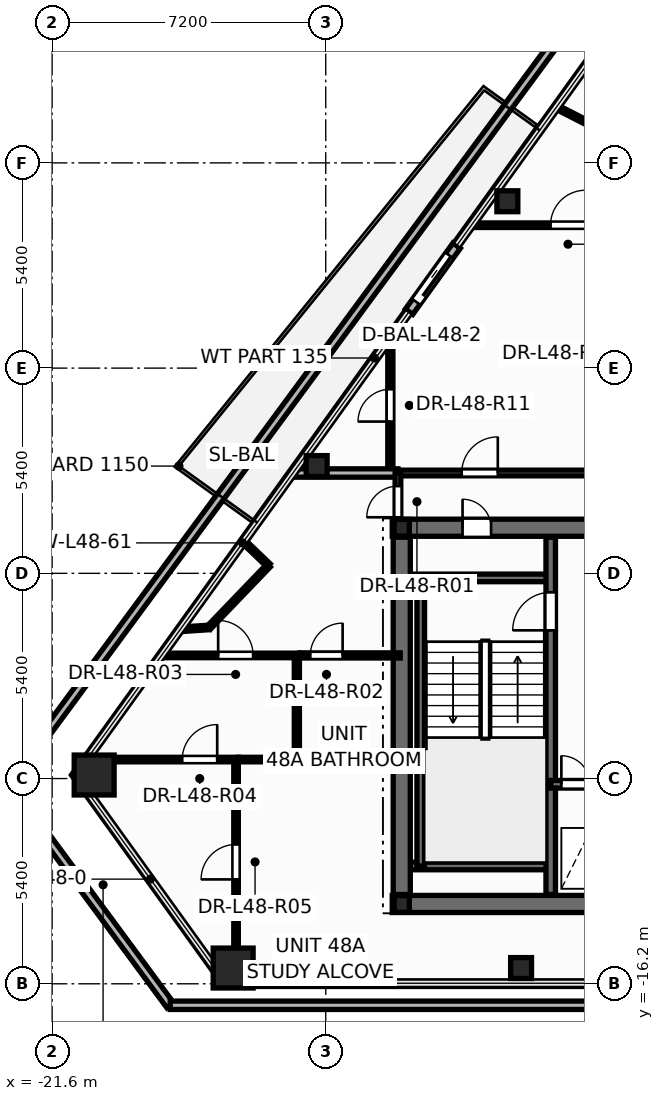
"""IFC4 building model, lengths in metres.
Left out: names, types, materials, properties, quantities, classifications, styles, units other than length and angle.
Written with IfcOpenShell. Run it as: python <this file> out.ifc"""

import sys

from ifc_helpers import new_model, si_unit, direction, frame, frame_2d, origin, origin_2d, place, context, subcontext, project, spatial, rectangle, hollow_rectangle, hollow_circle, i_section, extrude, element, fill, save


model = new_model("IFC4")
c1 = context("Model", 3, precision=1e-05, world=origin(), true_north=direction((0.0, 1.0)))
c2 = subcontext(c1, "Body", "Model", "MODEL_VIEW")
j1 = project(units=[si_unit("LENGTHUNIT", "METRE"), si_unit("PLANEANGLEUNIT", "RADIAN")], contexts=[c1])
p1 = place(None, origin())
s1 = spatial("IfcSite", under=j1, at=p1, CompositionType="ELEMENT")
p2 = place(p1, origin())
s2 = spatial("IfcBuilding", under=s1, at=p2, CompositionType="ELEMENT")
p3 = place(p2, frame((0.0, 0.0, 185.7)))
s3 = spatial("IfcBuildingStorey", under=s2, at=p3, CompositionType="ELEMENT", Elevation=185.7)
for number, where, z_axis, x_axis in (
    (1, (-20.494, -10.707, 0.0), (0.0, 0.0, 1.0), (1.0, 0.0, 0.0)),
    (2, (-16.836, -15.786, 0.0), (0.0, 0.0, 1.0), (1.0, 0.0, 0.0)),
):
    element("IfcColumn", number, at=place(p3, frame(where, z_axis=z_axis, x_axis=x_axis)), inside=s3, PredefinedType="COLUMN", context=c2, shape_type="SweptSolid", body=[
        extrude(hollow_rectangle(XDim=1.05, YDim=1.05, WallThickness=0.045, at=origin_2d()), origin(), (0.0, 0.0, 1.0), 3.6),
    ])
for number, where, z_axis, x_axis in (
    (3, (-9.26, -15.786, 0.0), (0.0, 0.0, 1.0), (1.0, 0.0, 0.0)),
    (4, (-9.621, 4.391, 0.0), (0.0, 0.0, 1.0), (1.0, 0.0, 0.0)),
    (5, (-14.639, -2.577, 0.0), (0.0, 0.0, 1.0), (1.0, 0.0, 0.0)),
):
    element("IfcColumn", number, at=place(p3, frame(where, z_axis=z_axis, x_axis=x_axis)), inside=s3, PredefinedType="COLUMN", context=c2, shape_type="SweptSolid", body=[
        extrude(hollow_circle(Radius=0.275, WallThickness=0.024, at=origin_2d()), origin(), (0.0, 0.0, 1.0), 3.6),
    ])
for number, where, z_axis, x_axis in (
    (6, (-12.4, -14.1, 0.0), (0.0, 0.0, 1.0), (1.0, 0.0, 0.0)),
    (7, (-12.4, -4.2, 0.0), (0.0, 0.0, 1.0), (1.0, 0.0, 0.0)),
):
    element("IfcColumn", number, at=place(p3, frame(where, z_axis=z_axis, x_axis=x_axis)), inside=s3, PredefinedType="COLUMN", context=c2, shape_type="SweptSolid", body=[
        extrude(i_section(OverallWidth=0.4, OverallDepth=0.44, WebThickness=0.028, FlangeThickness=0.04, at=origin_2d()), origin(), (0.0, 0.0, 1.0), 3.6),
    ])
p4 = place(p3, frame((-22.766, -10.97, -0.02), z_axis=(0.0, 0.0, 1.0), x_axis=(0.593481202181, -0.804847850627, 0.0)))
e8 = element("IfcWall", 8, at=p4, inside=s3, PredefinedType="PARAPET", context=c2, shape_type="SweptSolid", body=[
    extrude(rectangle(XDim=7.201, YDim=0.22, at=frame_2d((3.6, 0.0))), origin(), (0.0, 0.0, 1.0), 1.17),
])
p5 = place(p3, frame((-18.493, -16.766, -0.02), z_axis=(0.0, 0.0, 1.0), x_axis=(1.0, 0.0, 0.0)))
e9 = element("IfcWall", 9, at=p5, inside=s3, PredefinedType="PARAPET", context=c2, shape_type="SweptSolid", body=[
    extrude(rectangle(XDim=36.985, YDim=0.22, at=frame_2d((18.493, 0.0))), origin(), (0.0, 0.0, 1.0), 1.17),
])
p6 = place(p3, frame((-4.306, 14.064, -0.02), z_axis=(0.0, 0.0, 1.0), x_axis=(-0.593493783315, -0.804838573359, 0.0)))
e10 = element("IfcWall", 10, at=p6, inside=s3, PredefinedType="PARAPET", context=c2, shape_type="SweptSolid", body=[
    extrude(rectangle(XDim=31.104, YDim=0.22, at=frame_2d((15.552, 0.0))), origin(), (0.0, 0.0, 1.0), 1.17),
])
p7 = place(p3, frame((-10.956, 3.221, -0.015), z_axis=(0.0, 0.0, 1.0), x_axis=(-0.584352812003, -0.811499717255, 0.0)))
e11 = element("IfcWall", 11, at=p7, inside=s3, PredefinedType="STANDARD", context=c2, shape_type="SweptSolid", body=[
    extrude(rectangle(XDim=2.14, YDim=0.24, at=frame_2d((1.07, 0.0))), origin(), (0.0, 0.0, 1.0), 2.807),
])
p8 = place(p7, frame((0.32, 0.0, 0.015)))
e12 = element("IfcOpeningElement", 12, at=p8, cuts=e11, PredefinedType="OPENING", context=c2, shape_type="SweptSolid", body=[
    extrude(rectangle(XDim=1.506, YDim=2.204, at=frame_2d((0.75, 1.102))), frame((0.0, 0.13, 0.0), z_axis=(0.0, -1.0, 0.0), x_axis=(1.0, 0.0, 0.0)), (0.0, 0.0, 1.0), 0.26),
])
p9 = place(p3, frame((-12.65, -14.1, 0.0), z_axis=(0.0, 0.0, 1.0), x_axis=(1.0, 0.0, 0.0)))
e13 = element("IfcWall", 13, at=p9, inside=s3, PredefinedType="SHEAR", context=c2, shape_type="SweptSolid", body=[
    extrude(rectangle(XDim=25.3, YDim=0.45, at=frame_2d((12.65, 0.0))), origin(), (0.0, 0.0, 1.0), 3.6),
])
p10 = place(p3, frame((-12.65, -4.2, 0.0), z_axis=(0.0, 0.0, 1.0), x_axis=(1.0, 0.0, 0.0)))
e14 = element("IfcWall", 14, at=p10, inside=s3, PredefinedType="SHEAR", context=c2, shape_type="SweptSolid", body=[
    extrude(rectangle(XDim=25.3, YDim=0.45, at=frame_2d((12.65, 0.0))), origin(), (0.0, 0.0, 1.0), 3.6),
])
p11 = place(p10, frame((1.85, 0.0, 0.0)))
e15 = element("IfcOpeningElement", 15, at=p11, cuts=e14, PredefinedType="OPENING", context=c2, shape_type="SweptSolid", body=[
    extrude(rectangle(XDim=0.756, YDim=2.054, at=frame_2d((0.375, 1.027))), frame((0.0, 0.235, 0.0), z_axis=(0.0, -1.0, 0.0), x_axis=(1.0, 0.0, 0.0)), (0.0, 0.0, 1.0), 0.47),
])
p12 = place(p10, frame((22.65, 0.0, 0.0)))
e16 = element("IfcOpeningElement", 16, at=p12, cuts=e14, PredefinedType="OPENING", context=c2, shape_type="SweptSolid", body=[
    extrude(rectangle(XDim=0.756, YDim=2.054, at=frame_2d((0.375, 1.027))), frame((0.0, 0.235, 0.0), z_axis=(0.0, -1.0, 0.0), x_axis=(1.0, 0.0, 0.0)), (0.0, 0.0, 1.0), 0.47),
])
p13 = place(p10, frame((5.85, 0.0, 0.0)))
e17 = element("IfcOpeningElement", 17, at=p13, cuts=e14, PredefinedType="OPENING", context=c2, shape_type="SweptSolid", body=[
    extrude(rectangle(XDim=1.006, YDim=2.104, at=frame_2d((0.5, 1.052))), frame((0.0, 0.235, 0.0), z_axis=(0.0, -1.0, 0.0), x_axis=(1.0, 0.0, 0.0)), (0.0, 0.0, 1.0), 0.47),
])
p14 = place(p10, frame((10.35, 0.0, 0.0)))
e18 = element("IfcOpeningElement", 18, at=p14, cuts=e14, PredefinedType="OPENING", context=c2, shape_type="SweptSolid", body=[
    extrude(rectangle(XDim=1.406, YDim=2.154, at=frame_2d((0.7, 1.077))), frame((0.0, 0.235, 0.0), z_axis=(0.0, -1.0, 0.0), x_axis=(1.0, 0.0, 0.0)), (0.0, 0.0, 1.0), 0.47),
])
p15 = place(p10, frame((18.45, 0.0, 0.0)))
e19 = element("IfcOpeningElement", 19, at=p15, cuts=e14, PredefinedType="OPENING", context=c2, shape_type="SweptSolid", body=[
    extrude(rectangle(XDim=1.006, YDim=2.104, at=frame_2d((0.5, 1.052))), frame((0.0, 0.235, 0.0), z_axis=(0.0, -1.0, 0.0), x_axis=(1.0, 0.0, 0.0)), (0.0, 0.0, 1.0), 0.47),
])
for number, where, z_axis, x_axis in (
    (20, (-12.35, -5.52, 0.0), (0.0, 0.0, 1.0), (1.0, 0.0, 0.0)),
    (21, (-12.35, -13.1, 0.0), (0.0, 0.0, 1.0), (1.0, 0.0, 0.0)),
):
    element("IfcWall", number, at=place(p3, frame(where, z_axis=z_axis, x_axis=x_axis)), inside=s3, PredefinedType="SOLIDWALL", context=c2, shape_type="SweptSolid", body=[
        extrude(rectangle(XDim=3.87, YDim=0.2, at=frame_2d((1.935, 0.0))), origin(), (0.0, 0.0, 1.0), 3.6),
    ])
p16 = place(p3, frame((-11.9, -13.1, 0.0), z_axis=(0.0, 0.0, 1.0), x_axis=(0.0, 1.0, 0.0)))
e22 = element("IfcWall", 22, at=p16, inside=s3, PredefinedType="SOLIDWALL", context=c2, shape_type="SweptSolid", body=[
    extrude(rectangle(XDim=7.58, YDim=0.2, at=frame_2d((3.79, 0.0))), origin(), (0.0, 0.0, 1.0), 3.6),
])
p17 = place(p3, frame((-8.48, -13.85, 0.0), z_axis=(0.0, 0.0, 1.0), x_axis=(0.0, 1.0, 0.0)))
e23 = element("IfcWall", 23, at=p17, inside=s3, PredefinedType="SHEAR", context=c2, shape_type="SweptSolid", body=[
    extrude(rectangle(XDim=9.4, YDim=0.25, at=frame_2d((4.7, 0.0))), origin(), (0.0, 0.0, 1.0), 3.6),
])
p18 = place(p17, frame((6.95, 0.0, 0.0)))
e24 = element("IfcOpeningElement", 24, at=p18, cuts=e23, PredefinedType="OPENING", context=c2, shape_type="SweptSolid", body=[
    extrude(rectangle(XDim=1.006, YDim=2.104, at=frame_2d((0.5, 1.052))), frame((0.0, 0.135, 0.0), z_axis=(0.0, -1.0, 0.0), x_axis=(1.0, 0.0, 0.0)), (0.0, 0.0, 1.0), 0.27),
])
p19 = place(p3, frame((-8.48, -10.95, 0.0), z_axis=(0.0, 0.0, 1.0), x_axis=(1.0, 0.0, 0.0)))
e25 = element("IfcWall", 25, at=p19, inside=s3, PredefinedType="SOLIDWALL", context=c2, shape_type="SweptSolid", body=[
    extrude(rectangle(XDim=3.36, YDim=0.2, at=frame_2d((1.68, 0.0))), origin(), (0.0, 0.0, 1.0), 3.6),
])
p20 = place(p19, frame((0.28, 0.0, 0.0)))
e26 = element("IfcOpeningElement", 26, at=p20, cuts=e25, PredefinedType="OPENING", context=c2, shape_type="SweptSolid", body=[
    extrude(rectangle(XDim=0.756, YDim=2.054, at=frame_2d((0.375, 1.027))), frame((0.0, 0.11, 0.0), z_axis=(0.0, -1.0, 0.0), x_axis=(1.0, 0.0, 0.0)), (0.0, 0.0, 1.0), 0.22),
])
p21 = place(p19, frame((1.85, 0.0, 0.0)))
e27 = element("IfcOpeningElement", 27, at=p21, cuts=e25, PredefinedType="OPENING", context=c2, shape_type="SweptSolid", body=[
    extrude(rectangle(XDim=1.106, YDim=2.104, at=frame_2d((0.55, 1.052))), frame((0.0, 0.11, 0.0), z_axis=(0.0, -1.0, 0.0), x_axis=(1.0, 0.0, 0.0)), (0.0, 0.0, 1.0), 0.22),
])
p22 = place(p3, frame((-12.4, -13.85, 0.0), z_axis=(0.0, 0.0, 1.0), x_axis=(0.0, 1.0, 0.0)))
e28 = element("IfcWall", 28, at=p22, inside=s3, PredefinedType="SHEAR", context=c2, shape_type="SweptSolid", body=[
    extrude(rectangle(XDim=9.4, YDim=0.45, at=frame_2d((4.7, 0.0))), origin(), (0.0, 0.0, 1.0), 3.6),
])
p23 = place(p3, frame((-12.5, -2.76, 0.0), z_axis=(0.0, 0.0, 1.0), x_axis=(1.0, 0.0, 0.0)))
e29 = element("IfcWall", 29, at=p23, inside=s3, PredefinedType="PARTITIONING", context=c2, shape_type="SweptSolid", body=[
    extrude(rectangle(XDim=8.1, YDim=0.15, at=frame_2d((4.05, 0.0))), origin(), (0.0, 0.0, 1.0), 2.325),
])
p24 = place(p23, frame((1.678, 0.0, 0.0)))
e30 = element("IfcOpeningElement", 30, at=p24, cuts=e29, PredefinedType="OPENING", context=c2, shape_type="SweptSolid", body=[
    extrude(rectangle(XDim=0.956, YDim=2.104, at=frame_2d((0.475, 1.052))), frame((0.0, 0.085, 0.0), z_axis=(0.0, -1.0, 0.0), x_axis=(1.0, 0.0, 0.0)), (0.0, 0.0, 1.0), 0.17),
])
p25 = place(p3, frame((-16.76, -16.186, 0.0), z_axis=(0.0, 0.0, 1.0), x_axis=(0.0, 1.0, 0.0)))
e31 = element("IfcWall", 31, at=p25, inside=s3, PredefinedType="PARTITIONING", context=c2, shape_type="SweptSolid", body=[
    extrude(rectangle(XDim=5.885, YDim=0.12, at=frame_2d((2.943, 0.0))), origin(), (0.0, 0.0, 1.0), 2.325),
])
p26 = place(p25, frame((2.732, 0.0, 0.0)))
e32 = element("IfcOpeningElement", 32, at=p26, cuts=e31, PredefinedType="OPENING", context=c2, shape_type="SweptSolid", body=[
    extrude(rectangle(XDim=0.926, YDim=2.104, at=frame_2d((0.46, 1.052))), frame((0.0, 0.07, 0.0), z_axis=(0.0, -1.0, 0.0), x_axis=(1.0, 0.0, 0.0)), (0.0, 0.0, 1.0), 0.14),
])
p27 = place(p3, frame((-10.568, 3.76, 0.0), z_axis=(0.0, 0.0, 1.0), x_axis=(1.0, 0.0, 0.0)))
e33 = element("IfcWall", 33, at=p27, inside=s3, PredefinedType="PARTITIONING", context=c2, shape_type="SweptSolid", body=[
    extrude(rectangle(XDim=4.868, YDim=0.12, at=frame_2d((2.434, 0.0))), origin(), (0.0, 0.0, 1.0), 2.325),
])
p28 = place(p27, frame((2.083, 0.0, 0.0)))
e34 = element("IfcOpeningElement", 34, at=p28, cuts=e33, PredefinedType="OPENING", context=c2, shape_type="SweptSolid", body=[
    extrude(rectangle(XDim=0.926, YDim=2.104, at=frame_2d((0.46, 1.052))), frame((0.0, 0.07, 0.0), z_axis=(0.0, -1.0, 0.0), x_axis=(1.0, 0.0, 0.0)), (0.0, 0.0, 1.0), 0.14),
])
p29 = place(p3, frame((-20.694, -10.3, 0.0), z_axis=(0.0, 0.0, 1.0), x_axis=(1.0, 0.0, 0.0)))
e35 = element("IfcWall", 35, at=p29, inside=s3, PredefinedType="PARTITIONING", context=c2, shape_type="SweptSolid", body=[
    extrude(rectangle(XDim=3.994, YDim=0.12, at=frame_2d((1.997, 0.0))), origin(), (0.0, 0.0, 1.0), 2.325),
])
p30 = place(p29, frame((2.518, 0.0, 0.0)))
e36 = element("IfcOpeningElement", 36, at=p30, cuts=e35, PredefinedType="OPENING", context=c2, shape_type="SweptSolid", body=[
    extrude(rectangle(XDim=0.926, YDim=2.104, at=frame_2d((0.46, 1.052))), frame((0.0, 0.07, 0.0), z_axis=(0.0, -1.0, 0.0), x_axis=(1.0, 0.0, 0.0)), (0.0, 0.0, 1.0), 0.14),
])
p31 = place(p3, frame((-18.72, -7.56, 0.0), z_axis=(0.0, 0.0, 1.0), x_axis=(1.0, 0.0, 0.0)))
e37 = element("IfcWall", 37, at=p31, inside=s3, PredefinedType="PARTITIONING", context=c2, shape_type="SweptSolid", body=[
    extrude(rectangle(XDim=3.64, YDim=0.12, at=frame_2d((1.82, 0.0))), origin(), (0.0, 0.0, 1.0), 2.325),
])
p32 = place(p31, frame((1.489, 0.0, 0.0)))
e38 = element("IfcOpeningElement", 38, at=p32, cuts=e37, PredefinedType="OPENING", context=c2, shape_type="SweptSolid", body=[
    extrude(rectangle(XDim=0.926, YDim=2.104, at=frame_2d((0.46, 1.052))), frame((0.0, 0.07, 0.0), z_axis=(0.0, -1.0, 0.0), x_axis=(1.0, 0.0, 0.0)), (0.0, 0.0, 1.0), 0.14),
])
p33 = place(p3, frame((-12.7, -2.76, 0.0), z_axis=(0.0, 0.0, 1.0), x_axis=(0.0, 1.0, 0.0)))
e39 = element("IfcWall", 39, at=p33, inside=s3, PredefinedType="PARTITIONING", context=c2, shape_type="SweptSolid", body=[
    extrude(rectangle(XDim=3.559, YDim=0.135, at=frame_2d((1.78, 0.0))), origin(), (0.0, 0.0, 1.0), 2.325),
])
p34 = place(p33, frame((1.353, 0.0, 0.0)))
e40 = element("IfcOpeningElement", 40, at=p34, cuts=e39, PredefinedType="OPENING", context=c2, shape_type="SweptSolid", body=[
    extrude(rectangle(XDim=0.856, YDim=2.104, at=frame_2d((0.425, 1.052))), frame((0.0, 0.078, 0.0), z_axis=(0.0, -1.0, 0.0), x_axis=(1.0, 0.0, 0.0)), (0.0, 0.0, 1.0), 0.155),
])
p35 = place(p3, frame((-15.078, -7.56, 0.0), z_axis=(0.0, 0.0, 1.0), x_axis=(1.0, 0.0, 0.0)))
e41 = element("IfcWall", 41, at=p35, inside=s3, PredefinedType="PARTITIONING", context=c2, shape_type="SweptSolid", body=[
    extrude(rectangle(XDim=2.638, YDim=0.135, at=frame_2d((1.319, 0.0))), origin(), (0.0, 0.0, 1.0), 2.792),
])
p36 = place(p35, frame((0.272, 0.0, 0.0)))
e42 = element("IfcOpeningElement", 42, at=p36, cuts=e41, PredefinedType="OPENING", context=c2, shape_type="SweptSolid", body=[
    extrude(rectangle(XDim=0.856, YDim=2.104, at=frame_2d((0.425, 1.052))), frame((0.0, 0.078, 0.0), z_axis=(0.0, -1.0, 0.0), x_axis=(1.0, 0.0, 0.0)), (0.0, 0.0, 1.0), 0.155),
])
p37 = place(p3, frame((-15.16, -10.3, 0.0), z_axis=(0.0, 0.0, 1.0), x_axis=(0.0, 1.0, 0.0)))
e43 = element("IfcWall", 43, at=p37, inside=s3, PredefinedType="PARTITIONING", context=c2, shape_type="SweptSolid", body=[
    extrude(rectangle(XDim=2.74, YDim=0.135, at=frame_2d((1.37, 0.0))), origin(), (0.0, 0.0, 1.0), 3.35),
])
p38 = place(p3, frame((-15.16, -10.3, 0.0), z_axis=(0.0, 0.0, 1.0), x_axis=(1.0, 0.0, 0.0)))
e44 = element("IfcWall", 44, at=p38, inside=s3, PredefinedType="PARTITIONING", context=c2, shape_type="SweptSolid", body=[
    extrude(rectangle(XDim=2.72, YDim=0.135, at=frame_2d((1.36, 0.0))), origin(), (0.0, 0.0, 1.0), 2.792),
])
p39 = place(p3, frame((-15.263, -2.76, 0.0), z_axis=(0.0, 0.0, 1.0), x_axis=(1.0, 0.0, 0.0)))
e45 = element("IfcWall", 45, at=p39, inside=s3, PredefinedType="PARTITIONING", context=c2, shape_type="SweptSolid", body=[
    extrude(rectangle(XDim=2.763, YDim=0.22, at=frame_2d((1.382, 0.0))), origin(), (0.0, 0.0, 1.0), 2.325),
])
p40 = place(p3, frame((-15.903, -5.192, 0.0), z_axis=(0.0, 0.0, 1.0), x_axis=(-0.692938318289, -0.720996870345, 0.0)))
e46 = element("IfcWall", 46, at=p40, inside=s3, PredefinedType="PARTITIONING", context=c2, shape_type="SweptSolid", body=[
    extrude(rectangle(XDim=2.262, YDim=0.12, at=frame_2d((1.131, 0.0))), origin(), (0.0, 0.0, 1.0), 3.35),
])
p41 = place(p3, frame((-16.698, -10.3, 0.0), z_axis=(0.0, 0.0, 1.0), x_axis=(1.0, 0.0, 0.0)))
e47 = element("IfcWall", 47, at=p41, inside=s3, PredefinedType="PARTITIONING", context=c2, shape_type="SweptSolid", body=[
    extrude(rectangle(XDim=1.538, YDim=0.12, at=frame_2d((0.769, 0.0))), origin(), (0.0, 0.0, 1.0), 3.35),
])
p42 = place(p3, frame((-12.5, -4.24, 0.0), z_axis=(0.0, 0.0, 1.0), x_axis=(0.0, 1.0, 0.0)))
e48 = element("IfcWall", 48, at=p42, inside=s3, PredefinedType="PARTITIONING", context=c2, shape_type="SweptSolid", body=[
    extrude(rectangle(XDim=1.48, YDim=0.15, at=frame_2d((0.74, 0.0))), origin(), (0.0, 0.0, 1.0), 2.325),
])
p43 = place(p42, frame((0.315, 0.0, 0.0)))
e49 = element("IfcOpeningElement", 49, at=p43, cuts=e48, PredefinedType="OPENING", context=c2, shape_type="SweptSolid", body=[
    extrude(rectangle(XDim=0.826, YDim=2.104, at=frame_2d((0.41, 1.052))), frame((0.0, 0.085, 0.0), z_axis=(0.0, -1.0, 0.0), x_axis=(1.0, 0.0, 0.0)), (0.0, 0.0, 1.0), 0.17),
])
p44 = place(p3, frame((-16.553, -4.568, 0.0), z_axis=(0.0, 0.0, 1.0), x_axis=(0.72092156137, -0.693016668164, 0.0)))
e50 = element("IfcWall", 50, at=p44, inside=s3, PredefinedType="PARTITIONING", context=c2, shape_type="SweptSolid", body=[
    extrude(rectangle(XDim=0.901, YDim=0.12, at=frame_2d((0.451, 0.0))), origin(), (0.0, 0.0, 1.0), 2.792),
])
p45 = place(p3, frame((-7.518, 6.456, 0.0), z_axis=(0.0, 0.0, 1.0), x_axis=(-0.889930495704, 0.456096166194, 0.0)))
e51 = element("IfcWall", 51, at=p45, inside=s3, PredefinedType="PARTITIONING", context=c2, shape_type="SweptSolid", body=[
    extrude(rectangle(XDim=0.899, YDim=0.12, at=frame_2d((0.45, 0.0))), origin(), (0.0, 0.0, 1.0), 2.792),
])
p46 = place(p3, frame((-17.471, -6.823, 0.0), z_axis=(0.0, 0.0, 1.0), x_axis=(-0.997799657242, -0.066301161435, 0.0)))
e52 = element("IfcWall", 52, at=p46, inside=s3, PredefinedType="PARTITIONING", context=c2, shape_type="SweptSolid", body=[
    extrude(rectangle(XDim=0.744, YDim=0.12, at=frame_2d((0.372, 0.0))), origin(), (0.0, 0.0, 1.0), 2.792),
])
p47 = place(p8, origin())
e53 = element("IfcDoor", 53, at=p47, inside=s3, OperationType="SLIDING_TO_RIGHT", PredefinedType="DOOR", context=c2, shape_type="SweptSolid", body=[
    extrude(rectangle(XDim=1.5, YDim=2.2, at=frame_2d((0.75, 1.1))), frame((0.0, 0.025, 0.0), z_axis=(0.0, -1.0, 0.0), x_axis=(1.0, 0.0, 0.0)), (0.0, 0.0, 1.0), 0.05),
])
fill(e12, e53)
p48 = place(p18, origin())
e54 = element("IfcDoor", 54, at=p48, inside=s3, OperationType="SINGLE_SWING_LEFT", PredefinedType="DOOR", context=c2, shape_type="SweptSolid", body=[
    extrude(rectangle(XDim=1.0, YDim=2.1, at=frame_2d((0.5, 1.05))), frame((0.0, 0.025, 0.0), z_axis=(0.0, -1.0, 0.0), x_axis=(1.0, 0.0, 0.0)), (0.0, 0.0, 1.0), 0.05),
])
fill(e24, e54)
p49 = place(p20, origin())
e55 = element("IfcDoor", 55, at=p49, inside=s3, OperationType="SINGLE_SWING_LEFT", PredefinedType="DOOR", context=c2, shape_type="SweptSolid", body=[
    extrude(rectangle(XDim=0.75, YDim=2.05, at=frame_2d((0.375, 1.025))), frame((0.0, 0.025, 0.0), z_axis=(0.0, -1.0, 0.0), x_axis=(1.0, 0.0, 0.0)), (0.0, 0.0, 1.0), 0.05),
])
fill(e26, e55)
p50 = place(p11, origin())
e56 = element("IfcDoor", 56, at=p50, inside=s3, OperationType="SINGLE_SWING_LEFT", PredefinedType="DOOR", context=c2, shape_type="SweptSolid", body=[
    extrude(rectangle(XDim=0.75, YDim=2.05, at=frame_2d((0.375, 1.025))), frame((0.0, 0.025, 0.0), z_axis=(0.0, -1.0, 0.0), x_axis=(1.0, 0.0, 0.0)), (0.0, 0.0, 1.0), 0.05),
])
fill(e15, e56)
p51 = place(p43, origin())
e57 = element("IfcDoor", 57, at=p51, inside=s3, OperationType="SINGLE_SWING_LEFT", PredefinedType="DOOR", context=c2, shape_type="SweptSolid", body=[
    extrude(rectangle(XDim=0.82, YDim=2.1, at=frame_2d((0.41, 1.05))), frame((0.0, 0.025, 0.0), z_axis=(0.0, -1.0, 0.0), x_axis=(1.0, 0.0, 0.0)), (0.0, 0.0, 1.0), 0.05),
])
fill(e49, e57)
p52 = place(p36, origin())
e58 = element("IfcDoor", 58, at=p52, inside=s3, OperationType="SINGLE_SWING_RIGHT", PredefinedType="DOOR", context=c2, shape_type="SweptSolid", body=[
    extrude(rectangle(XDim=0.85, YDim=2.1, at=frame_2d((0.425, 1.05))), frame((0.0, 0.025, 0.0), z_axis=(0.0, -1.0, 0.0), x_axis=(1.0, 0.0, 0.0)), (0.0, 0.0, 1.0), 0.05),
])
fill(e42, e58)
p53 = place(p32, origin())
e59 = element("IfcDoor", 59, at=p53, inside=s3, OperationType="SINGLE_SWING_LEFT", PredefinedType="DOOR", context=c2, shape_type="SweptSolid", body=[
    extrude(rectangle(XDim=0.92, YDim=2.1, at=frame_2d((0.46, 1.05))), frame((0.0, 0.025, 0.0), z_axis=(0.0, -1.0, 0.0), x_axis=(1.0, 0.0, 0.0)), (0.0, 0.0, 1.0), 0.05),
])
fill(e38, e59)
p54 = place(p30, origin())
e60 = element("IfcDoor", 60, at=p54, inside=s3, OperationType="SINGLE_SWING_RIGHT", PredefinedType="DOOR", context=c2, shape_type="SweptSolid", body=[
    extrude(rectangle(XDim=0.92, YDim=2.1, at=frame_2d((0.46, 1.05))), frame((0.0, 0.025, 0.0), z_axis=(0.0, -1.0, 0.0), x_axis=(1.0, 0.0, 0.0)), (0.0, 0.0, 1.0), 0.05),
])
fill(e36, e60)
p55 = place(p26, origin())
e61 = element("IfcDoor", 61, at=p55, inside=s3, OperationType="SINGLE_SWING_LEFT", PredefinedType="DOOR", context=c2, shape_type="SweptSolid", body=[
    extrude(rectangle(XDim=0.92, YDim=2.1, at=frame_2d((0.46, 1.05))), frame((0.0, 0.025, 0.0), z_axis=(0.0, -1.0, 0.0), x_axis=(1.0, 0.0, 0.0)), (0.0, 0.0, 1.0), 0.05),
])
fill(e32, e61)
p56 = place(p34, origin())
e62 = element("IfcDoor", 62, at=p56, inside=s3, OperationType="SINGLE_SWING_LEFT", PredefinedType="DOOR", context=c2, shape_type="SweptSolid", body=[
    extrude(rectangle(XDim=0.85, YDim=2.1, at=frame_2d((0.425, 1.05))), frame((0.0, 0.025, 0.0), z_axis=(0.0, -1.0, 0.0), x_axis=(1.0, 0.0, 0.0)), (0.0, 0.0, 1.0), 0.05),
])
fill(e40, e62)
p57 = place(p24, origin())
e63 = element("IfcDoor", 63, at=p57, inside=s3, OperationType="SINGLE_SWING_RIGHT", PredefinedType="DOOR", context=c2, shape_type="SweptSolid", body=[
    extrude(rectangle(XDim=0.95, YDim=2.1, at=frame_2d((0.475, 1.05))), frame((0.0, 0.025, 0.0), z_axis=(0.0, -1.0, 0.0), x_axis=(1.0, 0.0, 0.0)), (0.0, 0.0, 1.0), 0.05),
])
fill(e30, e63)
p58 = place(p28, origin())
e64 = element("IfcDoor", 64, at=p58, inside=s3, OperationType="SINGLE_SWING_RIGHT", PredefinedType="DOOR", context=c2, shape_type="SweptSolid", body=[
    extrude(rectangle(XDim=0.92, YDim=2.1, at=frame_2d((0.46, 1.05))), frame((0.0, 0.025, 0.0), z_axis=(0.0, -1.0, 0.0), x_axis=(1.0, 0.0, 0.0)), (0.0, 0.0, 1.0), 0.05),
])
fill(e34, e64)
save(model, sys.argv[1])
